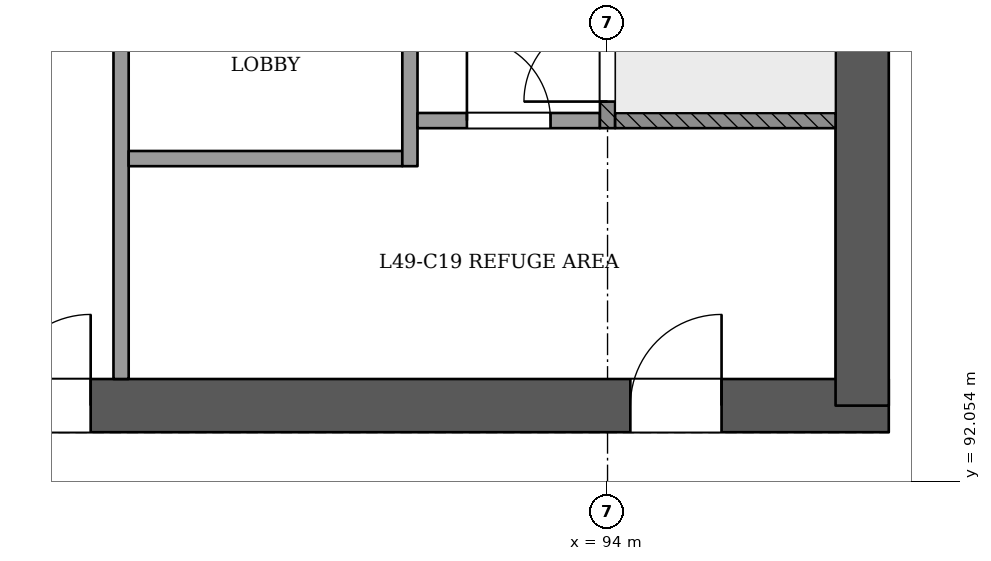
"""IFC4 building model, lengths in metres.
Left out: names, types, materials, properties, quantities, classifications, styles, units other than length and angle.
Written with IfcOpenShell. Run it as: python <this file> out.ifc"""

import sys

from ifc_helpers import new_model, si_unit, direction, frame, frame_2d, origin, place, context, subcontext, project, spatial, rectangle, extrude, element, fill, save


model = new_model("IFC4")
c1 = context("Model", 3, precision=1e-05, world=origin(), true_north=direction((0.0, 1.0)))
c2 = subcontext(c1, "Body", "Model", "MODEL_VIEW")
j1 = project(units=[si_unit("LENGTHUNIT", "METRE"), si_unit("PLANEANGLEUNIT", "RADIAN")], contexts=[c1])
p1 = place(None, origin())
s1 = spatial("IfcSite", under=j1, at=p1, CompositionType="ELEMENT")
p2 = place(p1, origin())
s2 = spatial("IfcBuilding", under=s1, at=p2, CompositionType="ELEMENT")
p3 = place(p2, frame((0.0, 0.0, 189.0)))
s3 = spatial("IfcBuildingStorey", under=s2, at=p3, CompositionType="ELEMENT", Elevation=189.0)
p4 = place(p3, frame((72.65, 93.05, 0.0), z_axis=(0.0, 0.0, 1.0), x_axis=(1.0, 0.0, 0.0)))
e1 = element("IfcWall", 1, at=p4, inside=s3, PredefinedType="SHEAR", context=c2, shape_type="SweptSolid", body=[
    extrude(rectangle(XDim=25.05, YDim=0.7, at=frame_2d((12.525, 0.0))), origin(), (0.0, 0.0, 1.0), 5.4),
])
p5 = place(p4, frame((1.15, 0.0, 0.0)))
e2 = element("IfcOpeningElement", 2, at=p5, cuts=e1, PredefinedType="OPENING", context=c2, shape_type="SweptSolid", body=[
    extrude(rectangle(XDim=1.2, YDim=2.1, at=frame_2d((0.6, 1.05))), frame((0.0, 0.36, 0.0), z_axis=(0.0, -1.0, 0.0), x_axis=(1.0, 0.0, 0.0)), (0.0, 0.0, 1.0), 0.721),
])
p6 = place(p4, frame((3.35, 0.0, 0.0)))
e3 = element("IfcOpeningElement", 3, at=p6, cuts=e1, PredefinedType="OPENING", context=c2, shape_type="SweptSolid", body=[
    extrude(rectangle(XDim=1.2, YDim=2.1, at=frame_2d((0.6, 1.05))), frame((0.0, 0.36, 0.0), z_axis=(0.0, -1.0, 0.0), x_axis=(1.0, 0.0, 0.0)), (0.0, 0.0, 1.0), 0.721),
])
p7 = place(p4, frame((13.35, 0.0, 0.0)))
e4 = element("IfcOpeningElement", 4, at=p7, cuts=e1, PredefinedType="OPENING", context=c2, shape_type="SweptSolid", body=[
    extrude(rectangle(XDim=1.2, YDim=2.1, at=frame_2d((0.6, 1.05))), frame((0.0, 0.36, 0.0), z_axis=(0.0, -1.0, 0.0), x_axis=(1.0, 0.0, 0.0)), (0.0, 0.0, 1.0), 0.721),
])
p8 = place(p4, frame((21.65, 0.0, 0.0)))
e5 = element("IfcOpeningElement", 5, at=p8, cuts=e1, PredefinedType="OPENING", context=c2, shape_type="SweptSolid", body=[
    extrude(rectangle(XDim=1.2, YDim=2.1, at=frame_2d((0.6, 1.05))), frame((0.0, 0.36, 0.0), z_axis=(0.0, -1.0, 0.0), x_axis=(1.0, 0.0, 0.0)), (0.0, 0.0, 1.0), 0.721),
])
p9 = place(p3, frame((97.35, 93.05, 0.0), z_axis=(0.0, 0.0, 1.0), x_axis=(0.0, 1.0, 0.0)))
e6 = element("IfcWall", 6, at=p9, inside=s3, PredefinedType="SHEAR", context=c2, shape_type="SweptSolid", body=[
    extrude(rectangle(XDim=11.05, YDim=0.7, at=frame_2d((5.525, 0.0))), origin(), (0.0, 0.0, 1.0), 5.4),
])
p10 = place(p3, frame((87.6, 93.4, 0.0), z_axis=(0.0, 0.0, 1.0), x_axis=(0.0, 1.0, 0.0)))
e7 = element("IfcWall", 7, at=p10, inside=s3, PredefinedType="PARTITIONING", context=c2, shape_type="SweptSolid", body=[
    extrude(rectangle(XDim=7.0, YDim=0.2, at=frame_2d((3.5, 0.0))), origin(), (0.0, 0.0, 1.0), 4.95),
])
p11 = place(p10, frame((4.45, 0.0, 0.0)))
e8 = element("IfcOpeningElement", 8, at=p11, cuts=e7, PredefinedType="OPENING", context=c2, shape_type="SweptSolid", body=[
    extrude(rectangle(XDim=1.1, YDim=2.1, at=frame_2d((0.55, 1.05))), frame((0.0, 0.11, 0.0), z_axis=(0.0, -1.0, 0.0), x_axis=(1.0, 0.0, 0.0)), (0.0, 0.0, 1.0), 0.221),
])
p12 = place(p3, frame((87.7, 96.3, 0.0), z_axis=(0.0, 0.0, 1.0), x_axis=(1.0, 0.0, 0.0)))
e9 = element("IfcWall", 9, at=p12, inside=s3, PredefinedType="PARTITIONING", context=c2, shape_type="SweptSolid", body=[
    extrude(rectangle(XDim=3.6, YDim=0.2, at=frame_2d((1.8, 0.0))), origin(), (0.0, 0.0, 1.0), 4.95),
])
p13 = place(p3, frame((91.4, 96.2, 0.0), z_axis=(0.0, 0.0, 1.0), x_axis=(0.0, 1.0, 0.0)))
e10 = element("IfcWall", 10, at=p13, inside=s3, PredefinedType="PARTITIONING", context=c2, shape_type="SweptSolid", body=[
    extrude(rectangle(XDim=4.2, YDim=0.2, at=frame_2d((2.1, 0.0))), origin(), (0.0, 0.0, 1.0), 4.95),
])
p14 = place(p13, frame((2.45, 0.0, 0.0)))
e11 = element("IfcOpeningElement", 11, at=p14, cuts=e10, PredefinedType="OPENING", context=c2, shape_type="SweptSolid", body=[
    extrude(rectangle(XDim=1.1, YDim=2.1, at=frame_2d((0.55, 1.05))), frame((0.0, 0.11, 0.0), z_axis=(0.0, -1.0, 0.0), x_axis=(1.0, 0.0, 0.0)), (0.0, 0.0, 1.0), 0.221),
])
p15 = place(p3, frame((91.5, 96.8, 0.0), z_axis=(0.0, 0.0, 1.0), x_axis=(1.0, 0.0, 0.0)))
e12 = element("IfcWall", 12, at=p15, inside=s3, PredefinedType="PARTITIONING", context=c2, shape_type="SweptSolid", body=[
    extrude(rectangle(XDim=2.4, YDim=0.2, at=frame_2d((1.2, 0.0))), origin(), (0.0, 0.0, 1.0), 4.95),
])
p16 = place(p15, frame((0.65, 0.0, 0.0)))
e13 = element("IfcOpeningElement", 13, at=p16, cuts=e12, PredefinedType="OPENING", context=c2, shape_type="SweptSolid", body=[
    extrude(rectangle(XDim=1.1, YDim=2.1, at=frame_2d((0.55, 1.05))), frame((0.0, 0.11, 0.0), z_axis=(0.0, -1.0, 0.0), x_axis=(1.0, 0.0, 0.0)), (0.0, 0.0, 1.0), 0.221),
])
p17 = place(p3, frame((94.0, 96.7, 0.0), z_axis=(0.0, 0.0, 1.0), x_axis=(0.0, 1.0, 0.0)))
e14 = element("IfcWall", 14, at=p17, inside=s3, PredefinedType="SOLIDWALL", context=c2, shape_type="SweptSolid", body=[
    extrude(rectangle(XDim=3.7, YDim=0.2, at=frame_2d((1.85, 0.0))), origin(), (0.0, 0.0, 1.0), 4.95),
])
p18 = place(p17, frame((0.35, 0.0, 0.0)))
e15 = element("IfcOpeningElement", 15, at=p18, cuts=e14, PredefinedType="OPENING", context=c2, shape_type="SweptSolid", body=[
    extrude(rectangle(XDim=1.1, YDim=2.1, at=frame_2d((0.55, 1.05))), frame((0.0, 0.11, 0.0), z_axis=(0.0, -1.0, 0.0), x_axis=(1.0, 0.0, 0.0)), (0.0, 0.0, 1.0), 0.221),
])
p19 = place(p3, frame((94.1, 96.8, 0.0), z_axis=(0.0, 0.0, 1.0), x_axis=(1.0, 0.0, 0.0)))
e16 = element("IfcWall", 16, at=p19, inside=s3, PredefinedType="SOLIDWALL", context=c2, shape_type="SweptSolid", body=[
    extrude(rectangle(XDim=2.9, YDim=0.2, at=frame_2d((1.45, 0.0))), origin(), (0.0, 0.0, 1.0), 4.95),
])
p20 = place(p18, origin())
e17 = element("IfcDoor", 17, at=p20, inside=s3, OperationType="SINGLE_SWING_LEFT", PredefinedType="NOTDEFINED", context=c2, shape_type="SweptSolid", body=[
    extrude(rectangle(XDim=1.1, YDim=2.1, at=frame_2d((0.55, 1.05))), frame((0.0, 0.025, 0.0), z_axis=(0.0, -1.0, 0.0), x_axis=(1.0, 0.0, 0.0)), (0.0, 0.0, 1.0), 0.05),
])
fill(e15, e17)
p21 = place(p7, origin())
e18 = element("IfcDoor", 18, at=p21, inside=s3, OperationType="SINGLE_SWING_RIGHT", PredefinedType="NOTDEFINED", context=c2, shape_type="SweptSolid", body=[
    extrude(rectangle(XDim=1.2, YDim=2.1, at=frame_2d((0.6, 1.05))), frame((0.0, 0.025, 0.0), z_axis=(0.0, -1.0, 0.0), x_axis=(1.0, 0.0, 0.0)), (0.0, 0.0, 1.0), 0.05),
])
fill(e4, e18)
p22 = place(p8, origin())
e19 = element("IfcDoor", 19, at=p22, inside=s3, OperationType="SINGLE_SWING_RIGHT", PredefinedType="NOTDEFINED", context=c2, shape_type="SweptSolid", body=[
    extrude(rectangle(XDim=1.2, YDim=2.1, at=frame_2d((0.6, 1.05))), frame((0.0, 0.025, 0.0), z_axis=(0.0, -1.0, 0.0), x_axis=(1.0, 0.0, 0.0)), (0.0, 0.0, 1.0), 0.05),
])
fill(e5, e19)
p23 = place(p16, origin())
e20 = element("IfcDoor", 20, at=p23, inside=s3, OperationType="SINGLE_SWING_LEFT", PredefinedType="NOTDEFINED", context=c2, shape_type="SweptSolid", body=[
    extrude(rectangle(XDim=1.1, YDim=2.1, at=frame_2d((0.55, 1.05))), frame((0.0, 0.025, 0.0), z_axis=(0.0, -1.0, 0.0), x_axis=(1.0, 0.0, 0.0)), (0.0, 0.0, 1.0), 0.05),
])
fill(e13, e20)
save(model, sys.argv[1])
